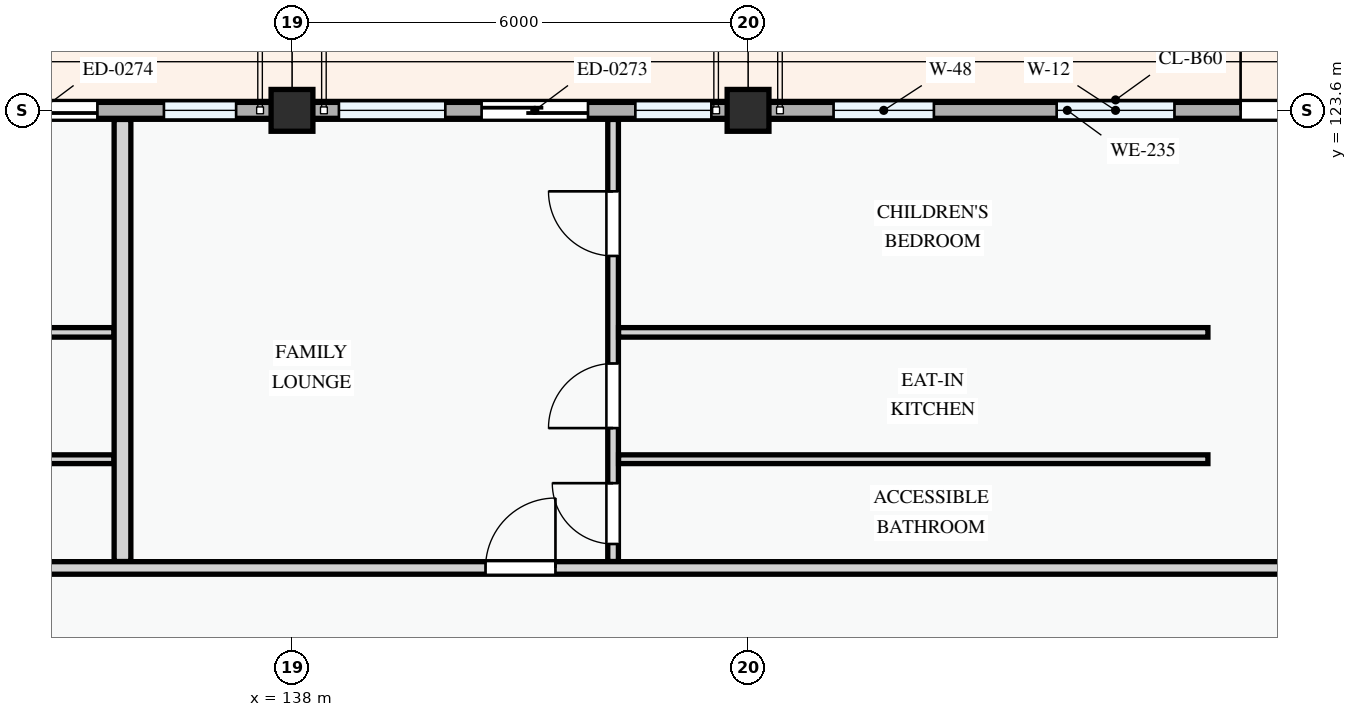
"""IFC4 building model, lengths in metres.
Left out: names, types, materials, properties, quantities, classifications, styles, units other than length and angle.
Written with IfcOpenShell. Run it as: python <this file> out.ifc"""

import sys

from ifc_helpers import new_model, si_unit, direction, frame, frame_2d, origin, origin_2d, place, context, subcontext, project, spatial, polyline, rectangle, outline, extrude, element, fill, save


model = new_model("IFC4")
c1 = context("Model", 3, precision=1e-05, world=origin(), true_north=direction((0.0, 1.0)))
c2 = subcontext(c1, "Body", "Model", "MODEL_VIEW")
j1 = project(units=[si_unit("LENGTHUNIT", "METRE"), si_unit("PLANEANGLEUNIT", "RADIAN")], contexts=[c1])
p1 = place(None, origin())
s1 = spatial("IfcSite", under=j1, at=p1, CompositionType="ELEMENT")
p2 = place(p1, origin())
s2 = spatial("IfcBuilding", under=s1, at=p2, CompositionType="ELEMENT")
p3 = place(p2, frame((0.0, 0.0, 41.1)))
s3 = spatial("IfcBuildingStorey", under=s2, at=p3, CompositionType="ELEMENT", Elevation=41.1)
for number, where, z_axis, x_axis in (
    (1, (138.0, 123.6, 0.0), (0.0, 0.0, 1.0), (1.0, 0.0, 0.0)),
    (2, (144.0, 123.6, 0.0), (0.0, 0.0, 1.0), (1.0, 0.0, 0.0)),
):
    element("IfcColumn", number, at=place(p3, frame(where, z_axis=z_axis, x_axis=x_axis)), inside=s3, PredefinedType="COLUMN", context=c2, shape_type="SweptSolid", body=[
        extrude(rectangle(XDim=0.55, YDim=0.55, at=origin_2d()), origin(), (0.0, 0.0, 1.0), 3.3),
    ])
p4 = place(p3, frame((152.4, 123.6, 0.0), z_axis=(0.0, 0.0, 1.0), x_axis=(-1.0, 0.0, 0.0)))
e3 = element("IfcWall", 3, at=p4, inside=s3, PredefinedType="STANDARD", context=c2, shape_type="SweptSolid", body=[
    extrude(rectangle(XDim=8.4, YDim=0.235, at=frame_2d((4.2, 0.0))), origin(), (0.0, 0.0, 1.0), 2.345),
])
p5 = place(p4, frame((0.62, 0.0, 0.0)))
e4 = element("IfcOpeningElement", 4, at=p5, cuts=e3, PredefinedType="OPENING", context=c2, shape_type="SweptSolid", body=[
    extrude(rectangle(XDim=1.3, YDim=2.15, at=frame_2d((0.65, 1.075))), frame((0.0, 0.127, 0.0), z_axis=(0.0, -1.0, 0.0), x_axis=(1.0, 0.0, 0.0)), (0.0, 0.0, 1.0), 0.255),
])
p6 = place(p4, frame((2.79, 0.0, 0.78)))
e5 = element("IfcOpeningElement", 5, at=p6, cuts=e3, PredefinedType="OPENING", context=c2, shape_type="SweptSolid", body=[
    extrude(rectangle(XDim=1.55, YDim=1.4, at=frame_2d((0.775, 0.7))), frame((0.0, 0.127, 0.0), z_axis=(0.0, -1.0, 0.0), x_axis=(1.0, 0.0, 0.0)), (0.0, 0.0, 1.0), 0.255),
])
p7 = place(p4, frame((5.955, 0.0, 0.78)))
e6 = element("IfcOpeningElement", 6, at=p7, cuts=e3, PredefinedType="OPENING", context=c2, shape_type="SweptSolid", body=[
    extrude(rectangle(XDim=1.32, YDim=1.35, at=frame_2d((0.66, 0.675))), frame((0.0, 0.127, 0.0), z_axis=(0.0, -1.0, 0.0), x_axis=(1.0, 0.0, 0.0)), (0.0, 0.0, 1.0), 0.255),
])
p8 = place(p3, frame((144.0, 123.6, 0.0), z_axis=(0.0, 0.0, 1.0), x_axis=(-1.0, 0.0, 0.0)))
e7 = element("IfcWall", 7, at=p8, inside=s3, PredefinedType="STANDARD", context=c2, shape_type="SweptSolid", body=[
    extrude(rectangle(XDim=6.0, YDim=0.235, at=frame_2d((3.0, 0.0))), origin(), (0.0, 0.0, 1.0), 2.445),
])
p9 = place(p8, frame((2.106, 0.0, 0.0)))
e8 = element("IfcOpeningElement", 8, at=p9, cuts=e7, PredefinedType="OPENING", context=c2, shape_type="SweptSolid", body=[
    extrude(rectangle(XDim=1.4, YDim=2.2, at=frame_2d((0.7, 1.1))), frame((0.0, 0.127, 0.0), z_axis=(0.0, -1.0, 0.0), x_axis=(1.0, 0.0, 0.0)), (0.0, 0.0, 1.0), 0.255),
])
p10 = place(p8, frame((0.483, 0.0, 0.78)))
e9 = element("IfcOpeningElement", 9, at=p10, cuts=e7, PredefinedType="OPENING", context=c2, shape_type="SweptSolid", body=[
    extrude(rectangle(XDim=1.0, YDim=1.25, at=frame_2d((0.5, 0.625))), frame((0.0, 0.127, 0.0), z_axis=(0.0, -1.0, 0.0), x_axis=(1.0, 0.0, 0.0)), (0.0, 0.0, 1.0), 0.255),
])
p11 = place(p8, frame((3.983, 0.0, 0.78)))
e10 = element("IfcOpeningElement", 10, at=p11, cuts=e7, PredefinedType="OPENING", context=c2, shape_type="SweptSolid", body=[
    extrude(rectangle(XDim=1.4, YDim=1.45, at=frame_2d((0.7, 0.725))), frame((0.0, 0.127, 0.0), z_axis=(0.0, -1.0, 0.0), x_axis=(1.0, 0.0, 0.0)), (0.0, 0.0, 1.0), 0.255),
])
p12 = place(p3, frame((138.0, 123.6, 0.0), z_axis=(0.0, 0.0, 1.0), x_axis=(-1.0, 0.0, 0.0)))
e11 = element("IfcWall", 11, at=p12, inside=s3, PredefinedType="STANDARD", context=c2, shape_type="SweptSolid", body=[
    extrude(rectangle(XDim=8.4, YDim=0.235, at=frame_2d((4.2, 0.0))), origin(), (0.0, 0.0, 1.0), 2.345),
])
p13 = place(p12, frame((2.56, 0.0, 0.0)))
e12 = element("IfcOpeningElement", 12, at=p13, cuts=e11, PredefinedType="OPENING", context=c2, shape_type="SweptSolid", body=[
    extrude(rectangle(XDim=1.5, YDim=2.2, at=frame_2d((0.75, 1.1))), frame((0.0, 0.127, 0.0), z_axis=(0.0, -1.0, 0.0), x_axis=(1.0, 0.0, 0.0)), (0.0, 0.0, 1.0), 0.255),
])
p14 = place(p12, frame((0.735, 0.0, 0.78)))
e13 = element("IfcOpeningElement", 13, at=p14, cuts=e11, PredefinedType="OPENING", context=c2, shape_type="SweptSolid", body=[
    extrude(rectangle(XDim=0.95, YDim=1.15, at=frame_2d((0.475, 0.575))), frame((0.0, 0.127, 0.0), z_axis=(0.0, -1.0, 0.0), x_axis=(1.0, 0.0, 0.0)), (0.0, 0.0, 1.0), 0.255),
])
p15 = place(p12, frame((5.685, 0.0, 0.78)))
e14 = element("IfcOpeningElement", 14, at=p15, cuts=e11, PredefinedType="OPENING", context=c2, shape_type="SweptSolid", body=[
    extrude(rectangle(XDim=0.95, YDim=1.15, at=frame_2d((0.475, 0.575))), frame((0.0, 0.127, 0.0), z_axis=(0.0, -1.0, 0.0), x_axis=(1.0, 0.0, 0.0)), (0.0, 0.0, 1.0), 0.255),
])
p16 = place(p3, frame((152.4, 123.6, 3.3), z_axis=(0.0, 0.0, 1.0), x_axis=(-1.0, 0.0, 0.0)))
e15 = element("IfcWall", 15, at=p16, inside=s3, PredefinedType="PARAPET", context=c2, shape_type="SweptSolid", body=[
    extrude(outline(polyline([(0.0, 0.0), (8.4, 0.0), (8.4, 1.12), (7.7, 1.322), (7.0, 1.485), (6.3, 1.618), (5.6, 1.718), (4.9, 1.779), (4.2, 1.8), (3.5, 1.779), (2.8, 1.718), (2.1, 1.618), (1.4, 1.485), (0.7, 1.322), (0.0, 1.12), (0.0, 0.0)])), frame((0.0, 0.105, 0.0), z_axis=(0.0, -1.0, 0.0), x_axis=(1.0, 0.0, 0.0)), (0.0, 0.0, 1.0), 0.21),
])
p17 = place(p3, frame((144.0, 123.6, 3.3), z_axis=(0.0, 0.0, 1.0), x_axis=(-1.0, 0.0, 0.0)))
e16 = element("IfcWall", 16, at=p17, inside=s3, PredefinedType="PARAPET", context=c2, shape_type="SweptSolid", body=[
    extrude(outline(polyline([(0.0, 0.0), (6.0, 0.0), (6.0, 1.12), (5.5, 1.322), (5.0, 1.485), (4.5, 1.618), (4.0, 1.718), (3.5, 1.779), (3.0, 1.8), (2.5, 1.779), (2.0, 1.718), (1.5, 1.618), (1.0, 1.485), (0.5, 1.322), (0.0, 1.12), (0.0, 0.0)])), frame((0.0, 0.105, 0.0), z_axis=(0.0, -1.0, 0.0), x_axis=(1.0, 0.0, 0.0)), (0.0, 0.0, 1.0), 0.21),
])
p18 = place(p3, frame((138.0, 123.6, 3.3), z_axis=(0.0, 0.0, 1.0), x_axis=(-1.0, 0.0, 0.0)))
e17 = element("IfcWall", 17, at=p18, inside=s3, PredefinedType="PARAPET", context=c2, shape_type="SweptSolid", body=[
    extrude(outline(polyline([(0.0, 0.0), (8.4, 0.0), (8.4, 1.12), (7.7, 1.322), (7.0, 1.485), (6.3, 1.618), (5.6, 1.718), (4.9, 1.779), (4.2, 1.8), (3.5, 1.779), (2.8, 1.718), (2.1, 1.618), (1.4, 1.485), (0.7, 1.322), (0.0, 1.12), (0.0, 0.0)])), frame((0.0, 0.105, 0.0), z_axis=(0.0, -1.0, 0.0), x_axis=(1.0, 0.0, 0.0)), (0.0, 0.0, 1.0), 0.21),
])
p19 = place(p3, frame((127.883, 120.679, 0.0), z_axis=(0.0, 0.0, 1.0), x_axis=(1.0, 0.0, 0.0)))
e18 = element("IfcWall", 18, at=p19, inside=s3, PredefinedType="PARTITIONING", context=c2, shape_type="SweptSolid", body=[
    extrude(rectangle(XDim=7.775, YDim=0.125, at=frame_2d((3.888, 0.0))), origin(), (0.0, 0.0, 1.0), 3.0),
])
p20 = place(p3, frame((127.883, 119.01, 0.0), z_axis=(0.0, 0.0, 1.0), x_axis=(1.0, 0.0, 0.0)))
e19 = element("IfcWall", 19, at=p20, inside=s3, PredefinedType="PARTITIONING", context=c2, shape_type="SweptSolid", body=[
    extrude(rectangle(XDim=7.775, YDim=0.115, at=frame_2d((3.888, 0.0))), origin(), (0.0, 0.0, 1.0), 3.0),
])
p21 = place(p3, frame((142.224, 117.665, 0.0), z_axis=(0.0, 0.0, 1.0), x_axis=(0.0, 1.0, 0.0)))
e20 = element("IfcWall", 20, at=p21, inside=s3, PredefinedType="PARTITIONING", context=c2, shape_type="SweptSolid", body=[
    extrude(rectangle(XDim=5.816, YDim=0.14, at=frame_2d((2.908, 0.0))), origin(), (0.0, 0.0, 1.0), 3.0),
])
p22 = place(p21, frame((0.231, 0.0, 0.0)))
e21 = element("IfcOpeningElement", 21, at=p22, cuts=e20, PredefinedType="OPENING", context=c2, shape_type="SweptSolid", body=[
    extrude(rectangle(XDim=0.8, YDim=2.1, at=frame_2d((0.4, 1.05))), frame((0.0, 0.08, 0.0), z_axis=(0.0, -1.0, 0.0), x_axis=(1.0, 0.0, 0.0)), (0.0, 0.0, 1.0), 0.16),
])
p23 = place(p21, frame((1.755, 0.0, 0.0)))
e22 = element("IfcOpeningElement", 22, at=p23, cuts=e20, PredefinedType="OPENING", context=c2, shape_type="SweptSolid", body=[
    extrude(rectangle(XDim=0.85, YDim=2.1, at=frame_2d((0.425, 1.05))), frame((0.0, 0.08, 0.0), z_axis=(0.0, -1.0, 0.0), x_axis=(1.0, 0.0, 0.0)), (0.0, 0.0, 1.0), 0.16),
])
p24 = place(p21, frame((4.02, 0.0, 0.0)))
e23 = element("IfcOpeningElement", 23, at=p24, cuts=e20, PredefinedType="OPENING", context=c2, shape_type="SweptSolid", body=[
    extrude(rectangle(XDim=0.85, YDim=2.1, at=frame_2d((0.425, 1.05))), frame((0.0, 0.08, 0.0), z_axis=(0.0, -1.0, 0.0), x_axis=(1.0, 0.0, 0.0)), (0.0, 0.0, 1.0), 0.16),
])
p25 = place(p3, frame((142.296, 120.679, 0.0), z_axis=(0.0, 0.0, 1.0), x_axis=(1.0, 0.0, 0.0)))
e24 = element("IfcWall", 24, at=p25, inside=s3, PredefinedType="PARTITIONING", context=c2, shape_type="SweptSolid", body=[
    extrude(rectangle(XDim=7.754, YDim=0.125, at=frame_2d((3.877, 0.0))), origin(), (0.0, 0.0, 1.0), 3.0),
])
p26 = place(p3, frame((142.296, 119.01, 0.0), z_axis=(0.0, 0.0, 1.0), x_axis=(1.0, 0.0, 0.0)))
e25 = element("IfcWall", 25, at=p26, inside=s3, PredefinedType="PARTITIONING", context=c2, shape_type="SweptSolid", body=[
    extrude(rectangle(XDim=7.754, YDim=0.115, at=frame_2d((3.877, 0.0))), origin(), (0.0, 0.0, 1.0), 3.0),
])
p27 = place(p3, frame((135.77, 117.665, 0.0), z_axis=(0.0, 0.0, 1.0), x_axis=(0.0, 1.0, 0.0)))
e26 = element("IfcWall", 26, at=p27, inside=s3, PredefinedType="PARTITIONING", context=c2, shape_type="SweptSolid", body=[
    extrude(rectangle(XDim=5.816, YDim=0.22, at=frame_2d((2.908, 0.0))), origin(), (0.0, 0.0, 1.0), 3.0),
])
p28 = place(p3, frame((109.32, 117.58, 0.0), z_axis=(0.0, 0.0, 1.0), x_axis=(1.0, 0.0, 0.0)))
e27 = element("IfcWall", 27, at=p28, inside=s3, PredefinedType="PARTITIONING", context=c2, shape_type="SweptSolid", body=[
    extrude(rectangle(XDim=43.22, YDim=0.165, at=frame_2d((21.61, 0.0))), origin(), (0.0, 0.0, 1.0), 3.0),
])
p29 = place(p28, frame((2.344, 0.0, 0.0)))
e28 = element("IfcOpeningElement", 28, at=p29, cuts=e27, PredefinedType="OPENING", context=c2, shape_type="SweptSolid", body=[
    extrude(rectangle(XDim=0.92, YDim=2.1, at=frame_2d((0.46, 1.05))), frame((0.0, 0.093, 0.0), z_axis=(0.0, -1.0, 0.0), x_axis=(1.0, 0.0, 0.0)), (0.0, 0.0, 1.0), 0.185),
])
p30 = place(p28, frame((16.856, 0.0, 0.0)))
e29 = element("IfcOpeningElement", 29, at=p30, cuts=e27, PredefinedType="OPENING", context=c2, shape_type="SweptSolid", body=[
    extrude(rectangle(XDim=0.92, YDim=2.1, at=frame_2d((0.46, 1.05))), frame((0.0, 0.093, 0.0), z_axis=(0.0, -1.0, 0.0), x_axis=(1.0, 0.0, 0.0)), (0.0, 0.0, 1.0), 0.185),
])
p31 = place(p28, frame((31.227, 0.0, 0.0)))
e30 = element("IfcOpeningElement", 30, at=p31, cuts=e27, PredefinedType="OPENING", context=c2, shape_type="SweptSolid", body=[
    extrude(rectangle(XDim=0.92, YDim=2.1, at=frame_2d((0.46, 1.05))), frame((0.0, 0.093, 0.0), z_axis=(0.0, -1.0, 0.0), x_axis=(1.0, 0.0, 0.0)), (0.0, 0.0, 1.0), 0.185),
])
p32 = place(p5, frame((1.3, 0.0, 0.0), z_axis=(0.0, 0.0, 1.0), x_axis=(-1.0, 0.0, 0.0)))
e31 = element("IfcDoor", 31, at=p32, inside=s3, OperationType="SINGLE_SWING_LEFT", PredefinedType="DOOR", context=c2, shape_type="SweptSolid", body=[
    extrude(rectangle(XDim=1.3, YDim=2.15, at=frame_2d((0.65, 1.075))), frame((0.0, 0.025, 0.0), z_axis=(0.0, -1.0, 0.0), x_axis=(1.0, 0.0, 0.0)), (0.0, 0.0, 1.0), 0.05),
])
fill(e4, e31)
p33 = place(p6, origin())
e32 = element("IfcWindow", 32, at=p33, inside=s3, PartitioningType="SINGLE_PANEL", PredefinedType="WINDOW", context=c2, shape_type="SweptSolid", body=[
    extrude(rectangle(XDim=1.55, YDim=1.4, at=frame_2d((0.775, 0.7))), frame((0.0, 0.03, 0.0), z_axis=(0.0, -1.0, 0.0), x_axis=(1.0, 0.0, 0.0)), (0.0, 0.0, 1.0), 0.06),
])
fill(e5, e32)
p34 = place(p7, origin())
e33 = element("IfcWindow", 33, at=p34, inside=s3, PartitioningType="SINGLE_PANEL", PredefinedType="WINDOW", context=c2, shape_type="SweptSolid", body=[
    extrude(rectangle(XDim=1.32, YDim=1.35, at=frame_2d((0.66, 0.675))), frame((0.0, 0.03, 0.0), z_axis=(0.0, -1.0, 0.0), x_axis=(1.0, 0.0, 0.0)), (0.0, 0.0, 1.0), 0.06),
])
fill(e6, e33)
p35 = place(p9, frame((1.4, 0.0, 0.0), z_axis=(0.0, 0.0, 1.0), x_axis=(-1.0, 0.0, 0.0)))
e34 = element("IfcDoor", 34, at=p35, inside=s3, OperationType="SLIDING_TO_LEFT", PredefinedType="DOOR", context=c2, shape_type="SweptSolid", body=[
    extrude(rectangle(XDim=1.4, YDim=2.2, at=frame_2d((0.7, 1.1))), frame((0.0, 0.025, 0.0), z_axis=(0.0, -1.0, 0.0), x_axis=(1.0, 0.0, 0.0)), (0.0, 0.0, 1.0), 0.05),
])
fill(e8, e34)
p36 = place(p10, origin())
e35 = element("IfcWindow", 35, at=p36, inside=s3, PartitioningType="SINGLE_PANEL", PredefinedType="WINDOW", context=c2, shape_type="SweptSolid", body=[
    extrude(rectangle(XDim=1.0, YDim=1.25, at=frame_2d((0.5, 0.625))), frame((0.0, 0.03, 0.0), z_axis=(0.0, -1.0, 0.0), x_axis=(1.0, 0.0, 0.0)), (0.0, 0.0, 1.0), 0.06),
])
fill(e9, e35)
p37 = place(p11, origin())
e36 = element("IfcWindow", 36, at=p37, inside=s3, PartitioningType="SINGLE_PANEL", PredefinedType="WINDOW", context=c2, shape_type="SweptSolid", body=[
    extrude(rectangle(XDim=1.4, YDim=1.45, at=frame_2d((0.7, 0.725))), frame((0.0, 0.03, 0.0), z_axis=(0.0, -1.0, 0.0), x_axis=(1.0, 0.0, 0.0)), (0.0, 0.0, 1.0), 0.06),
])
fill(e10, e36)
p38 = place(p13, frame((1.5, 0.0, 0.0), z_axis=(0.0, 0.0, 1.0), x_axis=(-1.0, 0.0, 0.0)))
e37 = element("IfcDoor", 37, at=p38, inside=s3, OperationType="SLIDING_TO_RIGHT", PredefinedType="DOOR", context=c2, shape_type="SweptSolid", body=[
    extrude(rectangle(XDim=1.5, YDim=2.2, at=frame_2d((0.75, 1.1))), frame((0.0, 0.025, 0.0), z_axis=(0.0, -1.0, 0.0), x_axis=(1.0, 0.0, 0.0)), (0.0, 0.0, 1.0), 0.05),
])
fill(e12, e37)
p39 = place(p14, origin())
e38 = element("IfcWindow", 38, at=p39, inside=s3, PartitioningType="SINGLE_PANEL", PredefinedType="WINDOW", context=c2, shape_type="SweptSolid", body=[
    extrude(rectangle(XDim=0.95, YDim=1.15, at=frame_2d((0.475, 0.575))), frame((0.0, 0.03, 0.0), z_axis=(0.0, -1.0, 0.0), x_axis=(1.0, 0.0, 0.0)), (0.0, 0.0, 1.0), 0.06),
])
fill(e13, e38)
p40 = place(p22, origin())
e39 = element("IfcDoor", 39, at=p40, inside=s3, OperationType="SINGLE_SWING_RIGHT", PredefinedType="DOOR", context=c2, shape_type="SweptSolid", body=[
    extrude(rectangle(XDim=0.8, YDim=2.1, at=frame_2d((0.4, 1.05))), frame((0.0, 0.025, 0.0), z_axis=(0.0, -1.0, 0.0), x_axis=(1.0, 0.0, 0.0)), (0.0, 0.0, 1.0), 0.05),
])
fill(e21, e39)
p41 = place(p23, origin())
e40 = element("IfcDoor", 40, at=p41, inside=s3, OperationType="SINGLE_SWING_LEFT", PredefinedType="DOOR", context=c2, shape_type="SweptSolid", body=[
    extrude(rectangle(XDim=0.85, YDim=2.1, at=frame_2d((0.425, 1.05))), frame((0.0, 0.025, 0.0), z_axis=(0.0, -1.0, 0.0), x_axis=(1.0, 0.0, 0.0)), (0.0, 0.0, 1.0), 0.05),
])
fill(e22, e40)
p42 = place(p24, origin())
e41 = element("IfcDoor", 41, at=p42, inside=s3, OperationType="SINGLE_SWING_RIGHT", PredefinedType="DOOR", context=c2, shape_type="SweptSolid", body=[
    extrude(rectangle(XDim=0.85, YDim=2.1, at=frame_2d((0.425, 1.05))), frame((0.0, 0.025, 0.0), z_axis=(0.0, -1.0, 0.0), x_axis=(1.0, 0.0, 0.0)), (0.0, 0.0, 1.0), 0.05),
])
fill(e23, e41)
p43 = place(p31, origin())
e42 = element("IfcDoor", 42, at=p43, inside=s3, OperationType="SINGLE_SWING_RIGHT", PredefinedType="DOOR", context=c2, shape_type="SweptSolid", body=[
    extrude(rectangle(XDim=0.92, YDim=2.1, at=frame_2d((0.46, 1.05))), frame((0.0, 0.025, 0.0), z_axis=(0.0, -1.0, 0.0), x_axis=(1.0, 0.0, 0.0)), (0.0, 0.0, 1.0), 0.05),
])
fill(e30, e42)
save(model, sys.argv[1])
